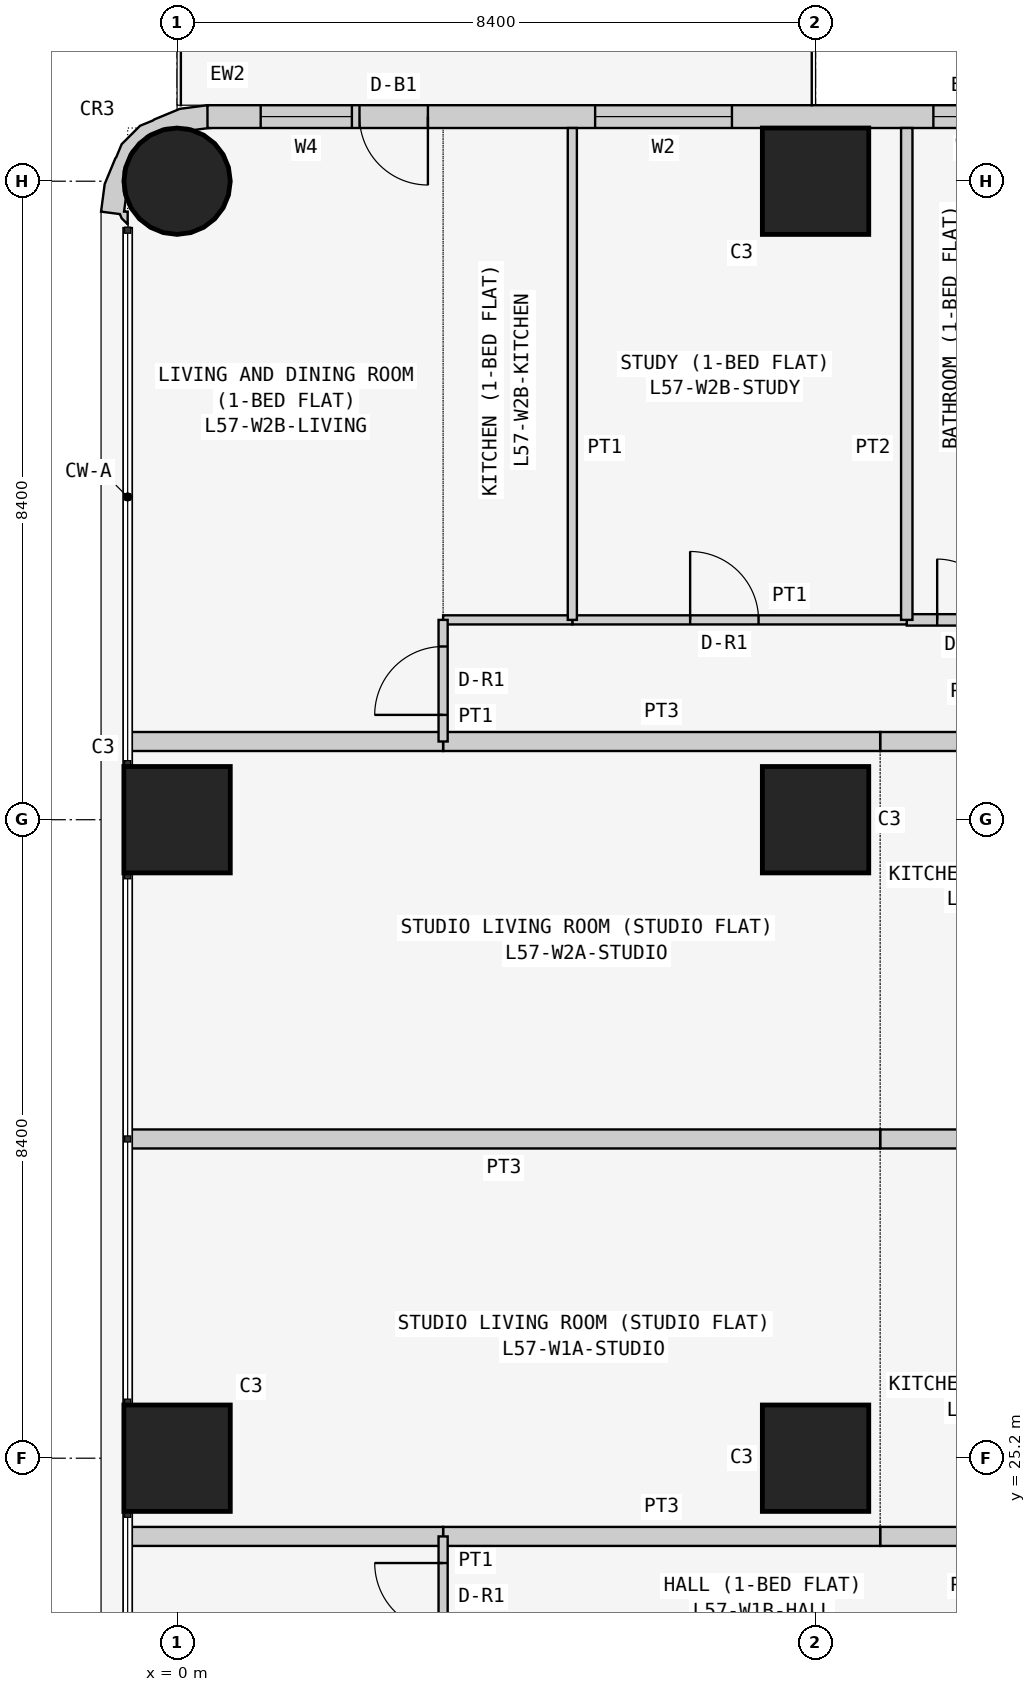
"""IFC4 building model, lengths in metres.
Left out: names, types, materials, properties, quantities, classifications, styles, units other than length and angle.
Written with IfcOpenShell. Run it as: python <this file> out.ifc"""

import sys

from ifc_helpers import new_model, si_unit, direction, frame, frame_2d, origin, origin_2d, place, context, subcontext, project, spatial, polyline, rectangle, circle, outline, extrude, element, fill, save


model = new_model("IFC4")
c1 = context("Model", 3, precision=1e-05, world=origin(), true_north=direction((0.0, 1.0)))
c2 = subcontext(c1, "Body", "Model", "MODEL_VIEW")
j1 = project(units=[si_unit("LENGTHUNIT", "METRE"), si_unit("PLANEANGLEUNIT", "RADIAN")], contexts=[c1])
p1 = place(None, origin())
s1 = spatial("IfcSite", under=j1, at=p1, CompositionType="ELEMENT")
p2 = place(p1, origin())
s2 = spatial("IfcBuilding", under=s1, at=p2, CompositionType="ELEMENT")
p3 = place(p2, frame((0.0, 0.0, 219.3)))
s3 = spatial("IfcBuildingStorey", under=s2, at=p3, CompositionType="ELEMENT", Elevation=219.3)
for number, where, z_axis, x_axis in (
    (1, (0.0, 25.2, 0.0), (0.0, 0.0, 1.0), (1.0, 0.0, 0.0)),
    (2, (0.0, 33.6, 0.0), (0.0, 0.0, 1.0), (1.0, 0.0, 0.0)),
):
    element("IfcColumn", number, at=place(p3, frame(where, z_axis=z_axis, x_axis=x_axis)), inside=s3, PredefinedType="COLUMN", context=c2, shape_type="SweptSolid", body=[
        extrude(rectangle(XDim=1.4, YDim=1.4, at=origin_2d()), origin(), (0.0, 0.0, 1.0), 3.6),
    ])
p4 = place(p3, frame((0.0, 42.0, 0.0), z_axis=(0.0, 0.0, 1.0), x_axis=(1.0, 0.0, 0.0)))
e3 = element("IfcColumn", 3, at=p4, inside=s3, PredefinedType="COLUMN", context=c2, shape_type="SweptSolid", body=[
    extrude(circle(Radius=0.7, at=origin_2d()), origin(), (0.0, 0.0, 1.0), 3.6),
])
for number, where, z_axis, x_axis in (
    (4, (8.4, 25.2, 0.0), (0.0, 0.0, 1.0), (1.0, 0.0, 0.0)),
    (5, (8.4, 33.6, 0.0), (0.0, 0.0, 1.0), (1.0, 0.0, 0.0)),
    (6, (8.4, 42.0, 0.0), (0.0, 0.0, 1.0), (1.0, 0.0, 0.0)),
):
    element("IfcColumn", number, at=place(p3, frame(where, z_axis=z_axis, x_axis=x_axis)), inside=s3, PredefinedType="COLUMN", context=c2, shape_type="SweptSolid", body=[
        extrude(rectangle(XDim=1.4, YDim=1.4, at=origin_2d()), origin(), (0.0, 0.0, 1.0), 3.6),
    ])
p5 = place(p3, frame((15.8, 42.85, 0.0), z_axis=(0.0, 0.0, 1.0), x_axis=(-1.0, 0.0, 0.0)))
e7 = element("IfcWall", 7, at=p5, inside=s3, PredefinedType="SOLIDWALL", context=c2, shape_type="SweptSolid", body=[
    extrude(rectangle(XDim=15.4, YDim=0.3, at=frame_2d((7.7, 0.0))), origin(), (0.0, 0.0, 1.0), 3.45),
])
p6 = place(p5, frame((1.2, 0.0, 0.9)))
e8 = element("IfcOpeningElement", 8, at=p6, cuts=e7, PredefinedType="OPENING", context=c2, shape_type="SweptSolid", body=[
    extrude(rectangle(XDim=1.8, YDim=1.5, at=frame_2d((0.9, 0.75))), frame((0.0, 0.16, 0.0), z_axis=(0.0, -1.0, 0.0), x_axis=(1.0, 0.0, 0.0)), (0.0, 0.0, 1.0), 0.32),
])
p7 = place(p5, frame((4.95, 0.0, 1.5)))
e9 = element("IfcOpeningElement", 9, at=p7, cuts=e7, PredefinedType="OPENING", context=c2, shape_type="SweptSolid", body=[
    extrude(rectangle(XDim=0.9, YDim=0.7, at=frame_2d((0.45, 0.35))), frame((0.0, 0.16, 0.0), z_axis=(0.0, -1.0, 0.0), x_axis=(1.0, 0.0, 0.0)), (0.0, 0.0, 1.0), 0.32),
])
p8 = place(p5, frame((8.5, 0.0, 0.9)))
e10 = element("IfcOpeningElement", 10, at=p8, cuts=e7, PredefinedType="OPENING", context=c2, shape_type="SweptSolid", body=[
    extrude(rectangle(XDim=1.8, YDim=1.5, at=frame_2d((0.9, 0.75))), frame((0.0, 0.16, 0.0), z_axis=(0.0, -1.0, 0.0), x_axis=(1.0, 0.0, 0.0)), (0.0, 0.0, 1.0), 0.32),
])
p9 = place(p5, frame((12.5, 0.0, 0.0)))
e11 = element("IfcOpeningElement", 11, at=p9, cuts=e7, PredefinedType="OPENING", context=c2, shape_type="SweptSolid", body=[
    extrude(rectangle(XDim=0.9, YDim=2.4, at=frame_2d((0.45, 1.2))), frame((0.0, 0.16, 0.0), z_axis=(0.0, -1.0, 0.0), x_axis=(1.0, 0.0, 0.0)), (0.0, 0.0, 1.0), 0.32),
])
p10 = place(p5, frame((13.5, 0.0, 0.9)))
e12 = element("IfcOpeningElement", 12, at=p10, cuts=e7, PredefinedType="OPENING", context=c2, shape_type="SweptSolid", body=[
    extrude(rectangle(XDim=1.2, YDim=1.5, at=frame_2d((0.6, 0.75))), frame((0.0, 0.16, 0.0), z_axis=(0.0, -1.0, 0.0), x_axis=(1.0, 0.0, 0.0)), (0.0, 0.0, 1.0), 0.32),
])
p11 = place(p3, frame((0.29, 42.724, 0.0), z_axis=(0.0, 0.0, 1.0), x_axis=(-0.898030234854, 0.439933741929, 0.0)))
e13 = element("IfcWall", 13, at=p11, inside=s3, PredefinedType="SOLIDWALL", context=c2, shape_type="SweptSolid", body=[
    extrude(outline(polyline([(-0.145, -0.044), (0.022, -0.296), (0.327, -0.094), (0.568, 0.18), (0.578, 0.199), (0.7, 0.338), (0.811, 0.661), (0.799, 0.846), (0.803, 0.866), (0.78, 1.231), (0.664, 1.577), (0.426, 1.497), (0.382, 1.536), (0.276, 1.572), (0.349, 1.423), (0.392, 1.444), (0.453, 1.261), (0.51, 1.211), (0.632, 0.961), (0.65, 0.683), (0.56, 0.419), (0.375, 0.21), (0.125, 0.087), (0.05, 0.082), (-0.127, -0.035), (-0.145, -0.044)])), origin(), (0.0, 0.0, 1.0), 3.45),
])
for number, where, z_axis, x_axis in (
    (14, (9.25, 24.171, 0.0), (0.0, 0.0, 1.0), (1.0, 0.0, 0.0)),
    (15, (13.4, 29.4, 0.0), (0.0, 0.0, 1.0), (-1.0, 0.0, 0.0)),
):
    element("IfcWall", number, at=place(p3, frame(where, z_axis=z_axis, x_axis=x_axis)), inside=s3, PredefinedType="PARTITIONING", context=c2, shape_type="SweptSolid", body=[
        extrude(rectangle(XDim=4.15, YDim=0.25, at=frame_2d((2.075, 0.0))), origin(), (0.0, 0.0, 1.0), 3.45),
    ])
p12 = place(p3, frame((3.5, 24.171, 0.0), z_axis=(0.0, 0.0, 1.0), x_axis=(1.0, 0.0, 0.0)))
e16 = element("IfcWall", 16, at=p12, inside=s3, PredefinedType="PARTITIONING", context=c2, shape_type="SweptSolid", body=[
    extrude(rectangle(XDim=5.75, YDim=0.25, at=frame_2d((2.875, 0.0))), origin(), (0.0, 0.0, 1.0), 3.45),
])
p13 = place(p3, frame((-0.65, 24.171, 0.0), z_axis=(0.0, 0.0, 1.0), x_axis=(1.0, 0.0, 0.0)))
e17 = element("IfcWall", 17, at=p13, inside=s3, PredefinedType="PARTITIONING", context=c2, shape_type="SweptSolid", body=[
    extrude(rectangle(XDim=4.15, YDim=0.25, at=frame_2d((2.075, 0.0))), origin(), (0.0, 0.0, 1.0), 3.45),
])
p14 = place(p3, frame((9.25, 29.4, 0.0), z_axis=(0.0, 0.0, 1.0), x_axis=(-1.0, 0.0, 0.0)))
e18 = element("IfcWall", 18, at=p14, inside=s3, PredefinedType="PARTITIONING", context=c2, shape_type="SweptSolid", body=[
    extrude(rectangle(XDim=9.9, YDim=0.25, at=frame_2d((4.95, 0.0))), origin(), (0.0, 0.0, 1.0), 3.45),
])
p15 = place(p3, frame((3.5, 24.171, 0.0), z_axis=(0.0, 0.0, 1.0), x_axis=(0.0, -1.0, 0.0)))
e19 = element("IfcWall", 19, at=p15, inside=s3, PredefinedType="PARTITIONING", context=c2, shape_type="SweptSolid", body=[
    extrude(rectangle(XDim=1.6, YDim=0.12, at=frame_2d((0.8, 0.0))), origin(), (0.0, 0.0, 1.0), 3.45),
])
p16 = place(p15, frame((0.35, 0.0, 0.0)))
e20 = element("IfcOpeningElement", 20, at=p16, cuts=e19, PredefinedType="OPENING", context=c2, shape_type="SweptSolid", body=[
    extrude(rectangle(XDim=0.9, YDim=2.1, at=frame_2d((0.45, 1.05))), frame((0.0, 0.07, 0.0), z_axis=(0.0, -1.0, 0.0), x_axis=(1.0, 0.0, 0.0)), (0.0, 0.0, 1.0), 0.14),
])
p17 = place(p3, frame((9.25, 34.629, 0.0), z_axis=(0.0, 0.0, 1.0), x_axis=(1.0, 0.0, 0.0)))
e21 = element("IfcWall", 21, at=p17, inside=s3, PredefinedType="PARTITIONING", context=c2, shape_type="SweptSolid", body=[
    extrude(rectangle(XDim=4.15, YDim=0.25, at=frame_2d((2.075, 0.0))), origin(), (0.0, 0.0, 1.0), 3.45),
])
p18 = place(p3, frame((3.5, 34.629, 0.0), z_axis=(0.0, 0.0, 1.0), x_axis=(1.0, 0.0, 0.0)))
e22 = element("IfcWall", 22, at=p18, inside=s3, PredefinedType="PARTITIONING", context=c2, shape_type="SweptSolid", body=[
    extrude(rectangle(XDim=5.75, YDim=0.25, at=frame_2d((2.875, 0.0))), origin(), (0.0, 0.0, 1.0), 3.45),
])
p19 = place(p3, frame((-0.65, 34.629, 0.0), z_axis=(0.0, 0.0, 1.0), x_axis=(1.0, 0.0, 0.0)))
e23 = element("IfcWall", 23, at=p19, inside=s3, PredefinedType="PARTITIONING", context=c2, shape_type="SweptSolid", body=[
    extrude(rectangle(XDim=4.15, YDim=0.25, at=frame_2d((2.075, 0.0))), origin(), (0.0, 0.0, 1.0), 3.45),
])
p20 = place(p3, frame((9.6, 36.229, 0.0), z_axis=(0.0, 0.0, 1.0), x_axis=(1.0, 0.0, 0.0)))
e24 = element("IfcWall", 24, at=p20, inside=s3, PredefinedType="PARTITIONING", context=c2, shape_type="SweptSolid", body=[
    extrude(rectangle(XDim=1.6, YDim=0.15, at=frame_2d((0.8, 0.0))), origin(), (0.0, 0.0, 1.0), 3.45),
])
p21 = place(p20, frame((0.4, 0.0, 0.0)))
e25 = element("IfcOpeningElement", 25, at=p21, cuts=e24, PredefinedType="OPENING", context=c2, shape_type="SweptSolid", body=[
    extrude(rectangle(XDim=0.8, YDim=2.1, at=frame_2d((0.4, 1.05))), frame((0.0, 0.085, 0.0), z_axis=(0.0, -1.0, 0.0), x_axis=(1.0, 0.0, 0.0)), (0.0, 0.0, 1.0), 0.17),
])
p22 = place(p3, frame((5.2, 36.229, 0.0), z_axis=(0.0, 0.0, 1.0), x_axis=(1.0, 0.0, 0.0)))
e26 = element("IfcWall", 26, at=p22, inside=s3, PredefinedType="PARTITIONING", context=c2, shape_type="SweptSolid", body=[
    extrude(rectangle(XDim=4.4, YDim=0.12, at=frame_2d((2.2, 0.0))), origin(), (0.0, 0.0, 1.0), 3.45),
])
p23 = place(p22, frame((1.55, 0.0, 0.0)))
e27 = element("IfcOpeningElement", 27, at=p23, cuts=e26, PredefinedType="OPENING", context=c2, shape_type="SweptSolid", body=[
    extrude(rectangle(XDim=0.9, YDim=2.1, at=frame_2d((0.45, 1.05))), frame((0.0, 0.07, 0.0), z_axis=(0.0, -1.0, 0.0), x_axis=(1.0, 0.0, 0.0)), (0.0, 0.0, 1.0), 0.14),
])
p24 = place(p3, frame((3.5, 36.229, 0.0), z_axis=(0.0, 0.0, 1.0), x_axis=(1.0, 0.0, 0.0)))
e28 = element("IfcWall", 28, at=p24, inside=s3, PredefinedType="PARTITIONING", context=c2, shape_type="SweptSolid", body=[
    extrude(rectangle(XDim=1.7, YDim=0.12, at=frame_2d((0.85, 0.0))), origin(), (0.0, 0.0, 1.0), 3.45),
])
p25 = place(p3, frame((3.5, 34.629, 0.0), z_axis=(0.0, 0.0, 1.0), x_axis=(0.0, 1.0, 0.0)))
e29 = element("IfcWall", 29, at=p25, inside=s3, PredefinedType="PARTITIONING", context=c2, shape_type="SweptSolid", body=[
    extrude(rectangle(XDim=1.6, YDim=0.12, at=frame_2d((0.8, 0.0))), origin(), (0.0, 0.0, 1.0), 3.45),
])
p26 = place(p25, frame((0.35, 0.0, 0.0)))
e30 = element("IfcOpeningElement", 30, at=p26, cuts=e29, PredefinedType="OPENING", context=c2, shape_type="SweptSolid", body=[
    extrude(rectangle(XDim=0.9, YDim=2.1, at=frame_2d((0.45, 1.05))), frame((0.0, 0.07, 0.0), z_axis=(0.0, -1.0, 0.0), x_axis=(1.0, 0.0, 0.0)), (0.0, 0.0, 1.0), 0.14),
])
p27 = place(p3, frame((9.6, 36.229, 0.0), z_axis=(0.0, 0.0, 1.0), x_axis=(0.0, 1.0, 0.0)))
e31 = element("IfcWall", 31, at=p27, inside=s3, PredefinedType="PARTITIONING", context=c2, shape_type="SweptSolid", body=[
    extrude(rectangle(XDim=6.471, YDim=0.15, at=frame_2d((3.235, 0.0))), origin(), (0.0, 0.0, 1.0), 3.45),
])
p28 = place(p3, frame((5.2, 36.229, 0.0), z_axis=(0.0, 0.0, 1.0), x_axis=(0.0, 1.0, 0.0)))
e32 = element("IfcWall", 32, at=p28, inside=s3, PredefinedType="PARTITIONING", context=c2, shape_type="SweptSolid", body=[
    extrude(rectangle(XDim=6.471, YDim=0.12, at=frame_2d((3.235, 0.0))), origin(), (0.0, 0.0, 1.0), 3.45),
])
p29 = place(p7, origin())
e33 = element("IfcWindow", 33, at=p29, inside=s3, PartitioningType="SINGLE_PANEL", PredefinedType="WINDOW", context=c2, shape_type="SweptSolid", body=[
    extrude(rectangle(XDim=0.9, YDim=0.7, at=frame_2d((0.45, 0.35))), frame((0.0, 0.03, 0.0), z_axis=(0.0, -1.0, 0.0), x_axis=(1.0, 0.0, 0.0)), (0.0, 0.0, 1.0), 0.06),
])
fill(e9, e33)
p30 = place(p8, origin())
e34 = element("IfcWindow", 34, at=p30, inside=s3, PartitioningType="SINGLE_PANEL", PredefinedType="WINDOW", context=c2, shape_type="SweptSolid", body=[
    extrude(rectangle(XDim=1.8, YDim=1.5, at=frame_2d((0.9, 0.75))), frame((0.0, 0.03, 0.0), z_axis=(0.0, -1.0, 0.0), x_axis=(1.0, 0.0, 0.0)), (0.0, 0.0, 1.0), 0.06),
])
fill(e10, e34)
p31 = place(p9, origin())
e35 = element("IfcDoor", 35, at=p31, inside=s3, OperationType="SINGLE_SWING_LEFT", PredefinedType="DOOR", context=c2, shape_type="SweptSolid", body=[
    extrude(rectangle(XDim=0.9, YDim=2.4, at=frame_2d((0.45, 1.2))), frame((0.0, 0.025, 0.0), z_axis=(0.0, -1.0, 0.0), x_axis=(1.0, 0.0, 0.0)), (0.0, 0.0, 1.0), 0.05),
])
fill(e11, e35)
p32 = place(p10, origin())
e36 = element("IfcWindow", 36, at=p32, inside=s3, PartitioningType="SINGLE_PANEL", PredefinedType="WINDOW", context=c2, shape_type="SweptSolid", body=[
    extrude(rectangle(XDim=1.2, YDim=1.5, at=frame_2d((0.6, 0.75))), frame((0.0, 0.03, 0.0), z_axis=(0.0, -1.0, 0.0), x_axis=(1.0, 0.0, 0.0)), (0.0, 0.0, 1.0), 0.06),
])
fill(e12, e36)
p33 = place(p16, frame((0.9, 0.0, 0.0), z_axis=(0.0, 0.0, 1.0), x_axis=(-1.0, 0.0, 0.0)))
e37 = element("IfcDoor", 37, at=p33, inside=s3, OperationType="SINGLE_SWING_RIGHT", PredefinedType="DOOR", context=c2, shape_type="SweptSolid", body=[
    extrude(rectangle(XDim=0.9, YDim=2.1, at=frame_2d((0.45, 1.05))), frame((0.0, 0.025, 0.0), z_axis=(0.0, -1.0, 0.0), x_axis=(1.0, 0.0, 0.0)), (0.0, 0.0, 1.0), 0.05),
])
fill(e20, e37)
p34 = place(p21, origin())
e38 = element("IfcDoor", 38, at=p34, inside=s3, OperationType="SINGLE_SWING_LEFT", PredefinedType="DOOR", context=c2, shape_type="SweptSolid", body=[
    extrude(rectangle(XDim=0.8, YDim=2.1, at=frame_2d((0.4, 1.05))), frame((0.0, 0.025, 0.0), z_axis=(0.0, -1.0, 0.0), x_axis=(1.0, 0.0, 0.0)), (0.0, 0.0, 1.0), 0.05),
])
fill(e25, e38)
p35 = place(p23, origin())
e39 = element("IfcDoor", 39, at=p35, inside=s3, OperationType="SINGLE_SWING_LEFT", PredefinedType="DOOR", context=c2, shape_type="SweptSolid", body=[
    extrude(rectangle(XDim=0.9, YDim=2.1, at=frame_2d((0.45, 1.05))), frame((0.0, 0.025, 0.0), z_axis=(0.0, -1.0, 0.0), x_axis=(1.0, 0.0, 0.0)), (0.0, 0.0, 1.0), 0.05),
])
fill(e27, e39)
p36 = place(p26, origin())
e40 = element("IfcDoor", 40, at=p36, inside=s3, OperationType="SINGLE_SWING_LEFT", PredefinedType="DOOR", context=c2, shape_type="SweptSolid", body=[
    extrude(rectangle(XDim=0.9, YDim=2.1, at=frame_2d((0.45, 1.05))), frame((0.0, 0.025, 0.0), z_axis=(0.0, -1.0, 0.0), x_axis=(1.0, 0.0, 0.0)), (0.0, 0.0, 1.0), 0.05),
])
fill(e30, e40)
save(model, sys.argv[1])
